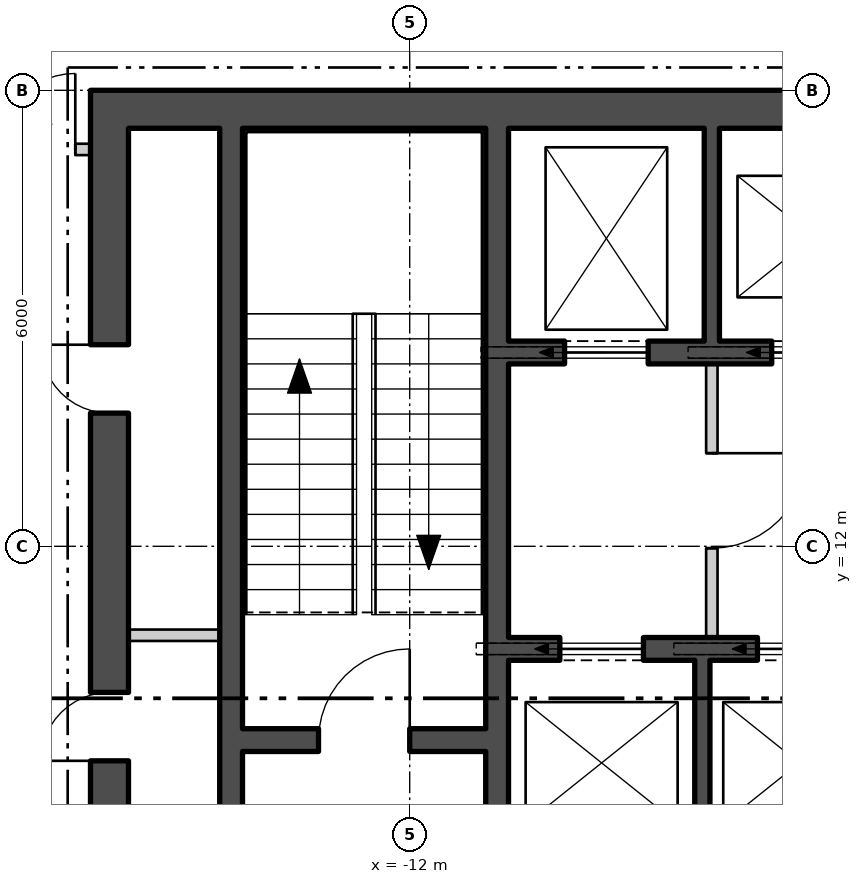
"""IFC4 building model, lengths in metres.
Left out: names, types, materials, properties, quantities, classifications, styles, units other than length and angle.
Written with IfcOpenShell. Run it as: python <this file> out.ifc"""

import sys

from ifc_helpers import new_model, si_unit, direction, frame, frame_2d, origin, place, context, subcontext, project, spatial, polyline, rectangle, outline, extrude, element, fill, save


model = new_model("IFC4")
c1 = context("Model", 3, precision=1e-05, world=origin(), true_north=direction((0.0, 1.0)))
c2 = subcontext(c1, "Body", "Model", "MODEL_VIEW")
j1 = project(units=[si_unit("LENGTHUNIT", "METRE"), si_unit("PLANEANGLEUNIT", "RADIAN")], contexts=[c1])
p1 = place(None, origin())
s1 = spatial("IfcSite", under=j1, at=p1, CompositionType="ELEMENT")
p2 = place(p1, origin())
s2 = spatial("IfcBuilding", under=s1, at=p2, CompositionType="ELEMENT")
p3 = place(p2, frame((0.0, 0.0, 174.9)))
s3 = spatial("IfcBuildingStorey", under=s2, at=p3, CompositionType="ELEMENT", Elevation=174.9)
p4 = place(p3, frame((-26.775, 13.22, -0.18), z_axis=(0.0, 0.0, 1.0), x_axis=(0.500000335318, -0.866025210188, 0.0)))
e1 = element("IfcWall", 1, at=p4, inside=s3, PredefinedType="SOLIDWALL", context=c2, shape_type="SweptSolid", body=[
    extrude(outline(polyline([(-0.13, -0.225), (45.88, -0.225), (45.62, 0.225), (0.13, 0.225), (-0.13, -0.225)])), origin(), (0.0, 0.0, 1.0), 3.68),
])
p5 = place(p4, frame((1.425, 0.0, 1.08)))
e2 = element("IfcOpeningElement", 2, at=p5, cuts=e1, PredefinedType="OPENING", context=c2, shape_type="SweptSolid", body=[
    extrude(rectangle(XDim=2.4, YDim=2.0, at=frame_2d((1.2, 1.0))), frame((0.0, 0.235, 0.0), z_axis=(0.0, -1.0, 0.0), x_axis=(1.0, 0.0, 0.0)), (0.0, 0.0, 1.0), 0.47),
])
p6 = place(p4, frame((5.895, 0.0, 1.08)))
e3 = element("IfcOpeningElement", 3, at=p6, cuts=e1, PredefinedType="OPENING", context=c2, shape_type="SweptSolid", body=[
    extrude(rectangle(XDim=2.4, YDim=2.0, at=frame_2d((1.2, 1.0))), frame((0.0, 0.235, 0.0), z_axis=(0.0, -1.0, 0.0), x_axis=(1.0, 0.0, 0.0)), (0.0, 0.0, 1.0), 0.47),
])
p7 = place(p4, frame((10.403, 0.0, 1.08)))
e4 = element("IfcOpeningElement", 4, at=p7, cuts=e1, PredefinedType="OPENING", context=c2, shape_type="SweptSolid", body=[
    extrude(rectangle(XDim=2.4, YDim=2.0, at=frame_2d((1.2, 1.0))), frame((0.0, 0.235, 0.0), z_axis=(0.0, -1.0, 0.0), x_axis=(1.0, 0.0, 0.0)), (0.0, 0.0, 1.0), 0.47),
])
p8 = place(p4, frame((14.912, 0.0, 1.08)))
e5 = element("IfcOpeningElement", 5, at=p8, cuts=e1, PredefinedType="OPENING", context=c2, shape_type="SweptSolid", body=[
    extrude(rectangle(XDim=2.4, YDim=2.0, at=frame_2d((1.2, 1.0))), frame((0.0, 0.235, 0.0), z_axis=(0.0, -1.0, 0.0), x_axis=(1.0, 0.0, 0.0)), (0.0, 0.0, 1.0), 0.47),
])
p9 = place(p4, frame((19.421, 0.0, 1.08)))
e6 = element("IfcOpeningElement", 6, at=p9, cuts=e1, PredefinedType="OPENING", context=c2, shape_type="SweptSolid", body=[
    extrude(rectangle(XDim=2.4, YDim=2.0, at=frame_2d((1.2, 1.0))), frame((0.0, 0.235, 0.0), z_axis=(0.0, -1.0, 0.0), x_axis=(1.0, 0.0, 0.0)), (0.0, 0.0, 1.0), 0.47),
])
p10 = place(p4, frame((23.929, 0.0, 1.08)))
e7 = element("IfcOpeningElement", 7, at=p10, cuts=e1, PredefinedType="OPENING", context=c2, shape_type="SweptSolid", body=[
    extrude(rectangle(XDim=2.4, YDim=2.0, at=frame_2d((1.2, 1.0))), frame((0.0, 0.235, 0.0), z_axis=(0.0, -1.0, 0.0), x_axis=(1.0, 0.0, 0.0)), (0.0, 0.0, 1.0), 0.47),
])
p11 = place(p4, frame((28.438, 0.0, 1.08)))
e8 = element("IfcOpeningElement", 8, at=p11, cuts=e1, PredefinedType="OPENING", context=c2, shape_type="SweptSolid", body=[
    extrude(rectangle(XDim=2.4, YDim=2.0, at=frame_2d((1.2, 1.0))), frame((0.0, 0.235, 0.0), z_axis=(0.0, -1.0, 0.0), x_axis=(1.0, 0.0, 0.0)), (0.0, 0.0, 1.0), 0.47),
])
p12 = place(p4, frame((32.947, 0.0, 1.08)))
e9 = element("IfcOpeningElement", 9, at=p12, cuts=e1, PredefinedType="OPENING", context=c2, shape_type="SweptSolid", body=[
    extrude(rectangle(XDim=2.4, YDim=2.0, at=frame_2d((1.2, 1.0))), frame((0.0, 0.235, 0.0), z_axis=(0.0, -1.0, 0.0), x_axis=(1.0, 0.0, 0.0)), (0.0, 0.0, 1.0), 0.47),
])
p13 = place(p4, frame((37.455, 0.0, 1.08)))
e10 = element("IfcOpeningElement", 10, at=p13, cuts=e1, PredefinedType="OPENING", context=c2, shape_type="SweptSolid", body=[
    extrude(rectangle(XDim=2.4, YDim=2.0, at=frame_2d((1.2, 1.0))), frame((0.0, 0.235, 0.0), z_axis=(0.0, -1.0, 0.0), x_axis=(1.0, 0.0, 0.0)), (0.0, 0.0, 1.0), 0.47),
])
p14 = place(p4, frame((41.925, 0.0, 1.08)))
e11 = element("IfcOpeningElement", 11, at=p14, cuts=e1, PredefinedType="OPENING", context=c2, shape_type="SweptSolid", body=[
    extrude(rectangle(XDim=2.4, YDim=2.0, at=frame_2d((1.2, 1.0))), frame((0.0, 0.235, 0.0), z_axis=(0.0, -1.0, 0.0), x_axis=(1.0, 0.0, 0.0)), (0.0, 0.0, 1.0), 0.47),
])
p15 = place(p3, frame((-16.2, 17.75, 0.0), z_axis=(0.0, 0.0, 1.0), x_axis=(1.0, 0.0, 0.0)))
e12 = element("IfcWall", 12, at=p15, inside=s3, PredefinedType="SHEAR", context=c2, shape_type="SweptSolid", body=[
    extrude(rectangle(XDim=32.4, YDim=0.5, at=frame_2d((16.2, 0.0))), origin(), (0.0, 0.0, 1.0), 3.7),
])
p16 = place(p3, frame((-15.95, 2.5, 0.0), z_axis=(0.0, 0.0, 1.0), x_axis=(0.0, 1.0, 0.0)))
e13 = element("IfcWall", 13, at=p16, inside=s3, PredefinedType="SHEAR", context=c2, shape_type="SweptSolid", body=[
    extrude(rectangle(XDim=15.0, YDim=0.5, at=frame_2d((7.5, 0.0))), origin(), (0.0, 0.0, 1.0), 3.7),
])
p17 = place(p16, frame((4.35, 0.0, 0.0)))
e14 = element("IfcOpeningElement", 14, at=p17, cuts=e13, PredefinedType="OPENING", context=c2, shape_type="SweptSolid", body=[
    extrude(rectangle(XDim=1.5, YDim=2.1, at=frame_2d((0.75, 1.05))), frame((0.0, 0.26, 0.0), z_axis=(0.0, -1.0, 0.0), x_axis=(1.0, 0.0, 0.0)), (0.0, 0.0, 1.0), 0.52),
])
p18 = place(p16, frame((0.4, 0.0, 0.0)))
e15 = element("IfcOpeningElement", 15, at=p18, cuts=e13, PredefinedType="OPENING", context=c2, shape_type="SweptSolid", body=[
    extrude(rectangle(XDim=1.0, YDim=2.1, at=frame_2d((0.5, 1.05))), frame((0.0, 0.26, 0.0), z_axis=(0.0, -1.0, 0.0), x_axis=(1.0, 0.0, 0.0)), (0.0, 0.0, 1.0), 0.52),
])
p19 = place(p16, frame((2.475, 0.0, 0.0)))
e16 = element("IfcOpeningElement", 16, at=p19, cuts=e13, PredefinedType="OPENING", context=c2, shape_type="SweptSolid", body=[
    extrude(rectangle(XDim=0.9, YDim=2.1, at=frame_2d((0.45, 1.05))), frame((0.0, 0.26, 0.0), z_axis=(0.0, -1.0, 0.0), x_axis=(1.0, 0.0, 0.0)), (0.0, 0.0, 1.0), 0.52),
])
p20 = place(p16, frame((6.677, 0.0, 0.0)))
e17 = element("IfcOpeningElement", 17, at=p20, cuts=e13, PredefinedType="OPENING", context=c2, shape_type="SweptSolid", body=[
    extrude(rectangle(XDim=0.9, YDim=2.1, at=frame_2d((0.45, 1.05))), frame((0.0, 0.26, 0.0), z_axis=(0.0, -1.0, 0.0), x_axis=(1.0, 0.0, 0.0)), (0.0, 0.0, 1.0), 0.52),
])
p21 = place(p16, frame((11.252, 0.0, 0.0)))
e18 = element("IfcOpeningElement", 18, at=p21, cuts=e13, PredefinedType="OPENING", context=c2, shape_type="SweptSolid", body=[
    extrude(rectangle(XDim=0.9, YDim=2.1, at=frame_2d((0.45, 1.05))), frame((0.0, 0.26, 0.0), z_axis=(0.0, -1.0, 0.0), x_axis=(1.0, 0.0, 0.0)), (0.0, 0.0, 1.0), 0.52),
])
p22 = place(p3, frame((-10.85, 2.5, 0.0), z_axis=(0.0, 0.0, 1.0), x_axis=(0.0, 1.0, 0.0)))
e19 = element("IfcWall", 19, at=p22, inside=s3, PredefinedType="SHEAR", context=c2, shape_type="SweptSolid", body=[
    extrude(rectangle(XDim=15.0, YDim=0.3, at=frame_2d((7.5, 0.0))), origin(), (0.0, 0.0, 1.0), 3.7),
])
p23 = place(p22, frame((3.475, 0.0, 0.0)))
e20 = element("IfcOpeningElement", 20, at=p23, cuts=e19, PredefinedType="OPENING", context=c2, shape_type="SweptSolid", body=[
    extrude(rectangle(XDim=1.25, YDim=2.1, at=frame_2d((0.625, 1.05))), frame((0.0, 0.16, 0.0), z_axis=(0.0, -1.0, 0.0), x_axis=(1.0, 0.0, 0.0)), (0.0, 0.0, 1.0), 0.32),
])
p24 = place(p22, frame((1.125, 0.0, 0.0)))
e21 = element("IfcOpeningElement", 21, at=p24, cuts=e19, PredefinedType="OPENING", context=c2, shape_type="SweptSolid", body=[
    extrude(rectangle(XDim=1.0, YDim=2.1, at=frame_2d((0.5, 1.05))), frame((0.0, 0.16, 0.0), z_axis=(0.0, -1.0, 0.0), x_axis=(1.0, 0.0, 0.0)), (0.0, 0.0, 1.0), 0.32),
])
p25 = place(p3, frame((-14.35, 2.5, 0.0), z_axis=(0.0, 0.0, 1.0), x_axis=(0.0, 1.0, 0.0)))
e22 = element("IfcWall", 22, at=p25, inside=s3, PredefinedType="SHEAR", context=c2, shape_type="SweptSolid", body=[
    extrude(rectangle(XDim=15.0, YDim=0.3, at=frame_2d((7.5, 0.0))), origin(), (0.0, 0.0, 1.0), 3.7),
])
p26 = place(p25, frame((4.35, 0.0, 0.0)))
e23 = element("IfcOpeningElement", 23, at=p26, cuts=e22, PredefinedType="OPENING", context=c2, shape_type="SweptSolid", body=[
    extrude(rectangle(XDim=1.5, YDim=2.1, at=frame_2d((0.75, 1.05))), frame((0.0, 0.16, 0.0), z_axis=(0.0, -1.0, 0.0), x_axis=(1.0, 0.0, 0.0)), (0.0, 0.0, 1.0), 0.32),
])
p27 = place(p3, frame((-14.2, 9.45, 0.0), z_axis=(0.0, 0.0, 1.0), x_axis=(1.0, 0.0, 0.0)))
e24 = element("IfcWall", 24, at=p27, inside=s3, PredefinedType="SHEAR", context=c2, shape_type="SweptSolid", body=[
    extrude(rectangle(XDim=3.2, YDim=0.3, at=frame_2d((1.6, 0.0))), origin(), (0.0, 0.0, 1.0), 3.7),
])
p28 = place(p27, frame((1.0, 0.0, 0.0)))
e25 = element("IfcOpeningElement", 25, at=p28, cuts=e24, PredefinedType="OPENING", context=c2, shape_type="SweptSolid", body=[
    extrude(rectangle(XDim=1.2, YDim=2.1, at=frame_2d((0.6, 1.05))), frame((0.0, 0.16, 0.0), z_axis=(0.0, -1.0, 0.0), x_axis=(1.0, 0.0, 0.0)), (0.0, 0.0, 1.0), 0.32),
])
p29 = place(p3, frame((-10.7, 14.55, 0.0), z_axis=(0.0, 0.0, 1.0), x_axis=(1.0, 0.0, 0.0)))
e26 = element("IfcWall", 26, at=p29, inside=s3, PredefinedType="SHEAR", context=c2, shape_type="SweptSolid", body=[
    extrude(rectangle(XDim=21.4, YDim=0.3, at=frame_2d((10.7, 0.0))), origin(), (0.0, 0.0, 1.0), 3.7),
])
p30 = place(p29, frame((0.738, 0.0, 0.0)))
e27 = element("IfcOpeningElement", 27, at=p30, cuts=e26, PredefinedType="OPENING", context=c2, shape_type="SweptSolid", body=[
    extrude(rectangle(XDim=1.1, YDim=2.1, at=frame_2d((0.55, 1.05))), frame((0.0, 0.16, 0.0), z_axis=(0.0, -1.0, 0.0), x_axis=(1.0, 0.0, 0.0)), (0.0, 0.0, 1.0), 0.32),
])
p31 = place(p29, frame((3.462, 0.0, 0.0)))
e28 = element("IfcOpeningElement", 28, at=p31, cuts=e26, PredefinedType="OPENING", context=c2, shape_type="SweptSolid", body=[
    extrude(rectangle(XDim=1.1, YDim=2.1, at=frame_2d((0.55, 1.05))), frame((0.0, 0.16, 0.0), z_axis=(0.0, -1.0, 0.0), x_axis=(1.0, 0.0, 0.0)), (0.0, 0.0, 1.0), 0.32),
])
p32 = place(p29, frame((6.138, 0.0, 0.0)))
e29 = element("IfcOpeningElement", 29, at=p32, cuts=e26, PredefinedType="OPENING", context=c2, shape_type="SweptSolid", body=[
    extrude(rectangle(XDim=1.1, YDim=2.1, at=frame_2d((0.55, 1.05))), frame((0.0, 0.16, 0.0), z_axis=(0.0, -1.0, 0.0), x_axis=(1.0, 0.0, 0.0)), (0.0, 0.0, 1.0), 0.32),
])
p33 = place(p29, frame((8.812, 0.0, 0.0)))
e30 = element("IfcOpeningElement", 30, at=p33, cuts=e26, PredefinedType="OPENING", context=c2, shape_type="SweptSolid", body=[
    extrude(rectangle(XDim=1.1, YDim=2.1, at=frame_2d((0.55, 1.05))), frame((0.0, 0.16, 0.0), z_axis=(0.0, -1.0, 0.0), x_axis=(1.0, 0.0, 0.0)), (0.0, 0.0, 1.0), 0.32),
])
p34 = place(p29, frame((19.562, 0.0, 0.0)))
e31 = element("IfcOpeningElement", 31, at=p34, cuts=e26, PredefinedType="OPENING", context=c2, shape_type="SweptSolid", body=[
    extrude(rectangle(XDim=1.1, YDim=2.1, at=frame_2d((0.55, 1.05))), frame((0.0, 0.16, 0.0), z_axis=(0.0, -1.0, 0.0), x_axis=(1.0, 0.0, 0.0)), (0.0, 0.0, 1.0), 0.32),
])
p35 = place(p29, frame((11.537, 0.0, 0.0)))
e32 = element("IfcOpeningElement", 32, at=p35, cuts=e26, PredefinedType="OPENING", context=c2, shape_type="SweptSolid", body=[
    extrude(rectangle(XDim=1.0, YDim=2.1, at=frame_2d((0.5, 1.05))), frame((0.0, 0.16, 0.0), z_axis=(0.0, -1.0, 0.0), x_axis=(1.0, 0.0, 0.0)), (0.0, 0.0, 1.0), 0.32),
])
p36 = place(p29, frame((15.55, 0.0, 0.0)))
e33 = element("IfcOpeningElement", 33, at=p36, cuts=e26, PredefinedType="OPENING", context=c2, shape_type="SweptSolid", body=[
    extrude(rectangle(XDim=1.0, YDim=2.1, at=frame_2d((0.5, 1.05))), frame((0.0, 0.16, 0.0), z_axis=(0.0, -1.0, 0.0), x_axis=(1.0, 0.0, 0.0)), (0.0, 0.0, 1.0), 0.32),
])
p37 = place(p3, frame((-10.7, 10.65, 0.0), z_axis=(0.0, 0.0, 1.0), x_axis=(1.0, 0.0, 0.0)))
e34 = element("IfcWall", 34, at=p37, inside=s3, PredefinedType="SHEAR", context=c2, shape_type="SweptSolid", body=[
    extrude(rectangle(XDim=10.3, YDim=0.3, at=frame_2d((5.15, 0.0))), origin(), (0.0, 0.0, 1.0), 3.7),
])
p38 = place(p37, frame((0.675, 0.0, 0.0)))
e35 = element("IfcOpeningElement", 35, at=p38, cuts=e34, PredefinedType="OPENING", context=c2, shape_type="SweptSolid", body=[
    extrude(rectangle(XDim=1.1, YDim=2.1, at=frame_2d((0.55, 1.05))), frame((0.0, 0.16, 0.0), z_axis=(0.0, -1.0, 0.0), x_axis=(1.0, 0.0, 0.0)), (0.0, 0.0, 1.0), 0.32),
])
p39 = place(p37, frame((3.275, 0.0, 0.0)))
e36 = element("IfcOpeningElement", 36, at=p39, cuts=e34, PredefinedType="OPENING", context=c2, shape_type="SweptSolid", body=[
    extrude(rectangle(XDim=1.1, YDim=2.1, at=frame_2d((0.55, 1.05))), frame((0.0, 0.16, 0.0), z_axis=(0.0, -1.0, 0.0), x_axis=(1.0, 0.0, 0.0)), (0.0, 0.0, 1.0), 0.32),
])
p40 = place(p37, frame((5.825, 0.0, 0.0)))
e37 = element("IfcOpeningElement", 37, at=p40, cuts=e34, PredefinedType="OPENING", context=c2, shape_type="SweptSolid", body=[
    extrude(rectangle(XDim=1.1, YDim=2.1, at=frame_2d((0.55, 1.05))), frame((0.0, 0.16, 0.0), z_axis=(0.0, -1.0, 0.0), x_axis=(1.0, 0.0, 0.0)), (0.0, 0.0, 1.0), 0.32),
])
p41 = place(p37, frame((8.425, 0.0, 0.0)))
e38 = element("IfcOpeningElement", 38, at=p41, cuts=e34, PredefinedType="OPENING", context=c2, shape_type="SweptSolid", body=[
    extrude(rectangle(XDim=1.0, YDim=2.1, at=frame_2d((0.5, 1.05))), frame((0.0, 0.16, 0.0), z_axis=(0.0, -1.0, 0.0), x_axis=(1.0, 0.0, 0.0)), (0.0, 0.0, 1.0), 0.32),
])
p42 = place(p3, frame((-8.025, 14.7, 0.0), z_axis=(0.0, 0.0, 1.0), x_axis=(0.0, 1.0, 0.0)))
e39 = element("IfcWall", 39, at=p42, inside=s3, PredefinedType="SHEAR", context=c2, shape_type="SweptSolid", body=[
    extrude(rectangle(XDim=2.8, YDim=0.2, at=frame_2d((1.4, 0.0))), origin(), (0.0, 0.0, 1.0), 3.7),
])
p43 = place(p3, frame((-8.15, 7.8, 0.0), z_axis=(0.0, 0.0, 1.0), x_axis=(0.0, 1.0, 0.0)))
e40 = element("IfcWall", 40, at=p43, inside=s3, PredefinedType="SHEAR", context=c2, shape_type="SweptSolid", body=[
    extrude(rectangle(XDim=2.7, YDim=0.2, at=frame_2d((1.35, 0.0))), origin(), (0.0, 0.0, 1.0), 3.7),
])
p44 = place(p3, frame((-8.025, 10.8, 0.0), z_axis=(0.0, 0.0, 1.0), x_axis=(0.0, 1.0, 0.0)))
e41 = element("IfcWall", 41, at=p44, inside=s3, PredefinedType="PARTITIONING", context=c2, shape_type="SweptSolid", body=[
    extrude(rectangle(XDim=3.6, YDim=0.15, at=frame_2d((1.8, 0.0))), origin(), (0.0, 0.0, 1.0), 3.7),
])
p45 = place(p44, frame((1.175, 0.0, 0.0)))
e42 = element("IfcOpeningElement", 42, at=p45, cuts=e41, PredefinedType="OPENING", context=c2, shape_type="SweptSolid", body=[
    extrude(rectangle(XDim=1.25, YDim=2.1, at=frame_2d((0.625, 1.05))), frame((0.0, 0.085, 0.0), z_axis=(0.0, -1.0, 0.0), x_axis=(1.0, 0.0, 0.0)), (0.0, 0.0, 1.0), 0.17),
])
p46 = place(p3, frame((-15.7, 10.829, 0.0), z_axis=(0.0, 0.0, 1.0), x_axis=(1.0, 0.0, 0.0)))
e43 = element("IfcWall", 43, at=p46, inside=s3, PredefinedType="PARTITIONING", context=c2, shape_type="SweptSolid", body=[
    extrude(rectangle(XDim=1.2, YDim=0.15, at=frame_2d((0.6, 0.0))), origin(), (0.0, 0.0, 1.0), 3.7),
])
p47 = place(p3, frame((-17.959, 17.222, 0.0), z_axis=(0.0, 0.0, 1.0), x_axis=(1.0, 0.0, 0.0)))
e44 = element("IfcWall", 44, at=p47, inside=s3, PredefinedType="PARTITIONING", context=c2, shape_type="SweptSolid", body=[
    extrude(rectangle(XDim=1.759, YDim=0.15, at=frame_2d((0.879, 0.0))), origin(), (0.0, 0.0, 1.0), 3.7),
])
p48 = place(p47, frame((0.559, 0.0, 0.0)))
e45 = element("IfcOpeningElement", 45, at=p48, cuts=e44, PredefinedType="OPENING", context=c2, shape_type="SweptSolid", body=[
    extrude(rectangle(XDim=1.0, YDim=2.1, at=frame_2d((0.5, 1.05))), frame((0.0, 0.085, 0.0), z_axis=(0.0, -1.0, 0.0), x_axis=(1.0, 0.0, 0.0)), (0.0, 0.0, 1.0), 0.17),
])
p49 = place(p30, origin())
e46 = element("IfcDoor", 46, at=p49, inside=s3, OperationType="SLIDING_TO_LEFT", PredefinedType="DOOR", context=c2, shape_type="SweptSolid", body=[
    extrude(rectangle(XDim=1.1, YDim=2.1, at=frame_2d((0.55, 1.05))), frame((0.0, 0.025, 0.0), z_axis=(0.0, -1.0, 0.0), x_axis=(1.0, 0.0, 0.0)), (0.0, 0.0, 1.0), 0.05),
])
fill(e27, e46)
p50 = place(p31, origin())
e47 = element("IfcDoor", 47, at=p50, inside=s3, OperationType="SLIDING_TO_LEFT", PredefinedType="DOOR", context=c2, shape_type="SweptSolid", body=[
    extrude(rectangle(XDim=1.1, YDim=2.1, at=frame_2d((0.55, 1.05))), frame((0.0, 0.025, 0.0), z_axis=(0.0, -1.0, 0.0), x_axis=(1.0, 0.0, 0.0)), (0.0, 0.0, 1.0), 0.05),
])
fill(e28, e47)
p51 = place(p38, origin())
e48 = element("IfcDoor", 48, at=p51, inside=s3, OperationType="SLIDING_TO_LEFT", PredefinedType="DOOR", context=c2, shape_type="SweptSolid", body=[
    extrude(rectangle(XDim=1.1, YDim=2.1, at=frame_2d((0.55, 1.05))), frame((0.0, 0.025, 0.0), z_axis=(0.0, -1.0, 0.0), x_axis=(1.0, 0.0, 0.0)), (0.0, 0.0, 1.0), 0.05),
])
fill(e35, e48)
p52 = place(p39, origin())
e49 = element("IfcDoor", 49, at=p52, inside=s3, OperationType="SLIDING_TO_LEFT", PredefinedType="DOOR", context=c2, shape_type="SweptSolid", body=[
    extrude(rectangle(XDim=1.1, YDim=2.1, at=frame_2d((0.55, 1.05))), frame((0.0, 0.025, 0.0), z_axis=(0.0, -1.0, 0.0), x_axis=(1.0, 0.0, 0.0)), (0.0, 0.0, 1.0), 0.05),
])
fill(e36, e49)
p53 = place(p45, origin())
e50 = element("IfcDoor", 50, at=p53, inside=s3, OperationType="SINGLE_SWING_RIGHT", PredefinedType="DOOR", context=c2, shape_type="SweptSolid", body=[
    extrude(rectangle(XDim=1.25, YDim=2.1, at=frame_2d((0.625, 1.05))), frame((0.0, 0.025, 0.0), z_axis=(0.0, -1.0, 0.0), x_axis=(1.0, 0.0, 0.0)), (0.0, 0.0, 1.0), 0.05),
])
fill(e42, e50)
p54 = place(p28, origin())
e51 = element("IfcDoor", 51, at=p54, inside=s3, OperationType="SINGLE_SWING_LEFT", PredefinedType="DOOR", context=c2, shape_type="SweptSolid", body=[
    extrude(rectangle(XDim=1.2, YDim=2.1, at=frame_2d((0.6, 1.05))), frame((0.0, 0.025, 0.0), z_axis=(0.0, -1.0, 0.0), x_axis=(1.0, 0.0, 0.0)), (0.0, 0.0, 1.0), 0.05),
])
fill(e25, e51)
p55 = place(p20, origin())
e52 = element("IfcDoor", 52, at=p55, inside=s3, OperationType="SINGLE_SWING_RIGHT", PredefinedType="DOOR", context=c2, shape_type="SweptSolid", body=[
    extrude(rectangle(XDim=0.9, YDim=2.1, at=frame_2d((0.45, 1.05))), frame((0.0, 0.025, 0.0), z_axis=(0.0, -1.0, 0.0), x_axis=(1.0, 0.0, 0.0)), (0.0, 0.0, 1.0), 0.05),
])
fill(e17, e52)
p56 = place(p21, origin())
e53 = element("IfcDoor", 53, at=p56, inside=s3, OperationType="SINGLE_SWING_LEFT", PredefinedType="DOOR", context=c2, shape_type="SweptSolid", body=[
    extrude(rectangle(XDim=0.9, YDim=2.1, at=frame_2d((0.45, 1.05))), frame((0.0, 0.025, 0.0), z_axis=(0.0, -1.0, 0.0), x_axis=(1.0, 0.0, 0.0)), (0.0, 0.0, 1.0), 0.05),
])
fill(e18, e53)
p57 = place(p48, origin())
e54 = element("IfcDoor", 54, at=p57, inside=s3, OperationType="SINGLE_SWING_LEFT", PredefinedType="DOOR", context=c2, shape_type="SweptSolid", body=[
    extrude(rectangle(XDim=1.0, YDim=2.1, at=frame_2d((0.5, 1.05))), frame((0.0, 0.025, 0.0), z_axis=(0.0, -1.0, 0.0), x_axis=(1.0, 0.0, 0.0)), (0.0, 0.0, 1.0), 0.05),
])
fill(e45, e54)
save(model, sys.argv[1])
